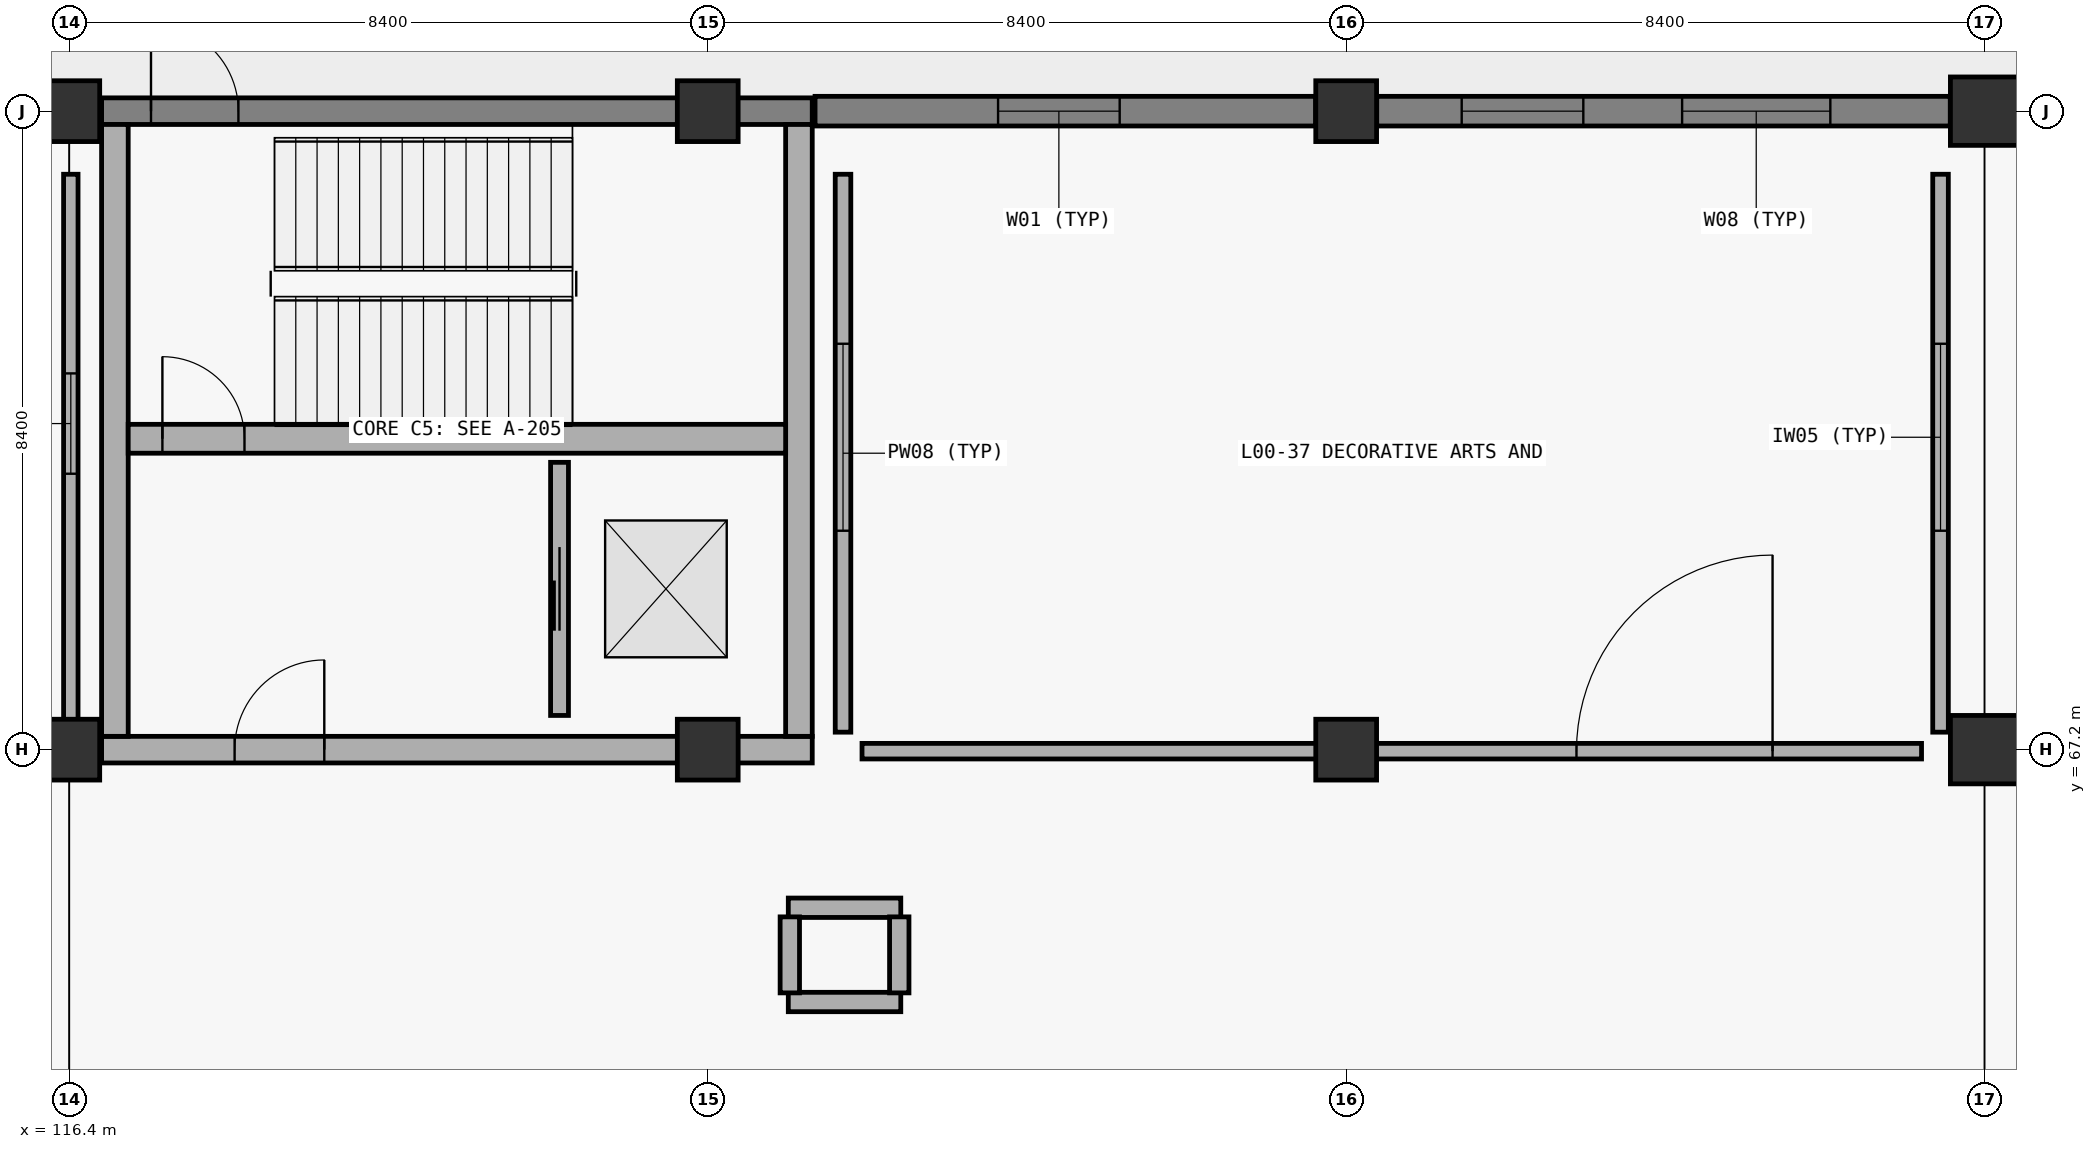
"""IFC4 building model, lengths in metres.
Left out: names, types, materials, properties, quantities, classifications, styles, units other than length and angle.
Written with IfcOpenShell. Run it as: python <this file> out.ifc"""

import sys

from ifc_helpers import new_model, si_unit, direction, frame, frame_2d, origin, origin_2d, place, context, subcontext, project, spatial, rectangle, extrude, element, fill, save


model = new_model("IFC4")
c1 = context("Model", 3, precision=1e-05, world=origin(), true_north=direction((0.0, 1.0)))
c2 = subcontext(c1, "Body", "Model", "MODEL_VIEW")
j1 = project(units=[si_unit("LENGTHUNIT", "METRE"), si_unit("PLANEANGLEUNIT", "RADIAN")], contexts=[c1])
p1 = place(None, origin())
s1 = spatial("IfcSite", under=j1, at=p1, CompositionType="ELEMENT")
p2 = place(p1, origin())
s2 = spatial("IfcBuilding", under=s1, at=p2, CompositionType="ELEMENT")
p3 = place(p2, origin())
s3 = spatial("IfcBuildingStorey", under=s2, at=p3, CompositionType="ELEMENT", Elevation=0.0)
for number, where, z_axis, x_axis in (
    (1, (116.4, 67.2, 0.0), (0.0, 0.0, 1.0), (1.0, 0.0, 0.0)),
    (2, (116.4, 75.6, 0.0), (0.0, 0.0, 1.0), (1.0, 0.0, 0.0)),
    (3, (124.8, 67.2, 0.0), (0.0, 0.0, 1.0), (1.0, 0.0, 0.0)),
    (4, (124.8, 75.6, 0.0), (0.0, 0.0, 1.0), (1.0, 0.0, 0.0)),
    (5, (133.2, 67.2, 0.0), (0.0, 0.0, 1.0), (1.0, 0.0, 0.0)),
    (6, (133.2, 75.6, 0.0), (0.0, 0.0, 1.0), (1.0, 0.0, 0.0)),
):
    element("IfcColumn", number, at=place(p3, frame(where, z_axis=z_axis, x_axis=x_axis)), inside=s3, PredefinedType="COLUMN", context=c2, shape_type="SweptSolid", body=[
        extrude(rectangle(XDim=0.8, YDim=0.8, at=origin_2d()), origin(), (0.0, 0.0, 1.0), 5.4),
    ])
for number, where, z_axis, x_axis in (
    (7, (141.6, 67.2, 0.0), (0.0, 0.0, 1.0), (1.0, 0.0, 0.0)),
    (8, (141.6, 75.6, 0.0), (0.0, 0.0, 1.0), (1.0, 0.0, 0.0)),
):
    element("IfcColumn", number, at=place(p3, frame(where, z_axis=z_axis, x_axis=x_axis)), inside=s3, PredefinedType="COLUMN", context=c2, shape_type="SweptSolid", body=[
        extrude(rectangle(XDim=0.9, YDim=0.9, at=origin_2d()), origin(), (0.0, 0.0, 1.0), 5.4),
    ])
p4 = place(p3, frame((116.825, 67.2, 0.0), z_axis=(0.0, 0.0, 1.0), x_axis=(1.0, 0.0, 0.0)))
e9 = element("IfcWall", 9, at=p4, inside=s3, PredefinedType="SHEAR", context=c2, shape_type="SweptSolid", body=[
    extrude(rectangle(XDim=9.35, YDim=0.35, at=frame_2d((4.675, 0.0))), origin(), (0.0, 0.0, 1.0), 5.4),
])
p5 = place(p4, frame((1.75, 0.0, 0.0)))
e10 = element("IfcOpeningElement", 10, at=p5, cuts=e9, PredefinedType="OPENING", context=c2, shape_type="SweptSolid", body=[
    extrude(rectangle(XDim=1.18, YDim=2.24, at=frame_2d((0.59, 1.12))), frame((0.0, 0.185, 0.0), z_axis=(0.0, -1.0, 0.0), x_axis=(1.0, 0.0, 0.0)), (0.0, 0.0, 1.0), 0.37),
])
p6 = place(p3, frame((116.825, 75.6, 0.0), z_axis=(0.0, 0.0, 1.0), x_axis=(1.0, 0.0, 0.0)))
e11 = element("IfcWall", 11, at=p6, inside=s3, PredefinedType="SHEAR", context=c2, shape_type="SweptSolid", body=[
    extrude(rectangle(XDim=9.35, YDim=0.35, at=frame_2d((4.675, 0.0))), origin(), (0.0, 0.0, 1.0), 5.4),
])
p7 = place(p6, frame((0.65, 0.0, 0.0)))
e12 = element("IfcOpeningElement", 12, at=p7, cuts=e11, PredefinedType="OPENING", context=c2, shape_type="SweptSolid", body=[
    extrude(rectangle(XDim=1.15, YDim=2.2, at=frame_2d((0.575, 1.1))), frame((0.0, 0.185, 0.0), z_axis=(0.0, -1.0, 0.0), x_axis=(1.0, 0.0, 0.0)), (0.0, 0.0, 1.0), 0.37),
])
for number, where, z_axis, x_axis in (
    (13, (117.0, 67.375, 0.0), (0.0, 0.0, 1.0), (0.0, 1.0, 0.0)),
    (14, (126.0, 67.375, 0.0), (0.0, 0.0, 1.0), (0.0, 1.0, 0.0)),
):
    element("IfcWall", number, at=place(p3, frame(where, z_axis=z_axis, x_axis=x_axis)), inside=s3, PredefinedType="SHEAR", context=c2, shape_type="SweptSolid", body=[
        extrude(rectangle(XDim=8.05, YDim=0.35, at=frame_2d((4.025, 0.0))), origin(), (0.0, 0.0, 1.0), 5.4),
    ])
p8 = place(p3, frame((117.175, 71.29, 0.0), z_axis=(0.0, 0.0, 1.0), x_axis=(1.0, 0.0, 0.0)))
e15 = element("IfcWall", 15, at=p8, inside=s3, PredefinedType="SHEAR", context=c2, shape_type="SweptSolid", body=[
    extrude(rectangle(XDim=8.65, YDim=0.38, at=frame_2d((4.325, 0.0))), origin(), (0.0, 0.0, 1.0), 5.4),
])
p9 = place(p8, frame((0.45, 0.0, 0.0)))
e16 = element("IfcOpeningElement", 16, at=p9, cuts=e15, PredefinedType="OPENING", context=c2, shape_type="SweptSolid", body=[
    extrude(rectangle(XDim=1.08, YDim=2.18, at=frame_2d((0.54, 1.09))), frame((0.0, 0.2, 0.0), z_axis=(0.0, -1.0, 0.0), x_axis=(1.0, 0.0, 0.0)), (0.0, 0.0, 1.0), 0.4),
])
p10 = place(p3, frame((108.402, 75.6, 0.0), z_axis=(0.0, 0.0, 1.0), x_axis=(1.0, 0.0, 0.0)))
e17 = element("IfcWall", 17, at=p10, inside=s3, PredefinedType="SOLIDWALL", context=c2, shape_type="SweptSolid", body=[
    extrude(rectangle(XDim=8.386, YDim=0.39, at=frame_2d((4.193, 0.0))), origin(), (0.0, 0.0, 1.0), 4.09),
])
p11 = place(p10, frame((1.118, 0.0, 0.85)))
e18 = element("IfcOpeningElement", 18, at=p11, cuts=e17, PredefinedType="OPENING", context=c2, shape_type="SweptSolid", body=[
    extrude(rectangle(XDim=1.6, YDim=2.5, at=frame_2d((0.8, 1.25))), frame((0.0, 0.205, 0.0), z_axis=(0.0, -1.0, 0.0), x_axis=(1.0, 0.0, 0.0)), (0.0, 0.0, 1.0), 0.41),
])
p12 = place(p10, frame((4.018, 0.0, 0.85)))
e19 = element("IfcOpeningElement", 19, at=p12, cuts=e17, PredefinedType="OPENING", context=c2, shape_type="SweptSolid", body=[
    extrude(rectangle(XDim=1.95, YDim=2.3, at=frame_2d((0.975, 1.15))), frame((0.0, 0.205, 0.0), z_axis=(0.0, -1.0, 0.0), x_axis=(1.0, 0.0, 0.0)), (0.0, 0.0, 1.0), 0.41),
])
p13 = place(p3, frame((126.212, 75.6, 0.0), z_axis=(0.0, 0.0, 1.0), x_axis=(1.0, 0.0, 0.0)))
e20 = element("IfcWall", 20, at=p13, inside=s3, PredefinedType="SOLIDWALL", context=c2, shape_type="SweptSolid", body=[
    extrude(rectangle(XDim=6.586, YDim=0.39, at=frame_2d((3.293, 0.0))), origin(), (0.0, 0.0, 1.0), 4.09),
])
p14 = place(p13, frame((2.408, 0.0, 0.85)))
e21 = element("IfcOpeningElement", 21, at=p14, cuts=e20, PredefinedType="OPENING", context=c2, shape_type="SweptSolid", body=[
    extrude(rectangle(XDim=1.6, YDim=2.5, at=frame_2d((0.8, 1.25))), frame((0.0, 0.205, 0.0), z_axis=(0.0, -1.0, 0.0), x_axis=(1.0, 0.0, 0.0)), (0.0, 0.0, 1.0), 0.41),
])
p15 = place(p3, frame((133.602, 75.6, 0.0), z_axis=(0.0, 0.0, 1.0), x_axis=(1.0, 0.0, 0.0)))
e22 = element("IfcWall", 22, at=p15, inside=s3, PredefinedType="SOLIDWALL", context=c2, shape_type="SweptSolid", body=[
    extrude(rectangle(XDim=7.546, YDim=0.39, at=frame_2d((3.773, 0.0))), origin(), (0.0, 0.0, 1.0), 4.09),
])
p16 = place(p15, frame((1.118, 0.0, 0.85)))
e23 = element("IfcOpeningElement", 23, at=p16, cuts=e22, PredefinedType="OPENING", context=c2, shape_type="SweptSolid", body=[
    extrude(rectangle(XDim=1.6, YDim=2.5, at=frame_2d((0.8, 1.25))), frame((0.0, 0.205, 0.0), z_axis=(0.0, -1.0, 0.0), x_axis=(1.0, 0.0, 0.0)), (0.0, 0.0, 1.0), 0.41),
])
p17 = place(p15, frame((4.018, 0.0, 0.85)))
e24 = element("IfcOpeningElement", 24, at=p17, cuts=e22, PredefinedType="OPENING", context=c2, shape_type="SweptSolid", body=[
    extrude(rectangle(XDim=1.95, YDim=2.3, at=frame_2d((0.975, 1.15))), frame((0.0, 0.205, 0.0), z_axis=(0.0, -1.0, 0.0), x_axis=(1.0, 0.0, 0.0)), (0.0, 0.0, 1.0), 0.41),
])
p18 = place(p3, frame((122.85, 67.65, 0.0), z_axis=(0.0, 0.0, 1.0), x_axis=(0.0, 1.0, 0.0)))
e25 = element("IfcWall", 25, at=p18, inside=s3, PredefinedType="PARTITIONING", context=c2, shape_type="SweptSolid", body=[
    extrude(rectangle(XDim=3.33, YDim=0.235, at=frame_2d((1.665, 0.0))), origin(), (0.0, 0.0, 1.0), 5.04),
])
p19 = place(p18, frame((1.115, 0.0, 0.0)))
e26 = element("IfcOpeningElement", 26, at=p19, cuts=e25, PredefinedType="OPENING", context=c2, shape_type="SweptSolid", body=[
    extrude(rectangle(XDim=1.1, YDim=2.2, at=frame_2d((0.55, 1.1))), frame((0.0, 0.127, 0.0), z_axis=(0.0, -1.0, 0.0), x_axis=(1.0, 0.0, 0.0)), (0.0, 0.0, 1.0), 0.255),
])
for number, where, z_axis, x_axis in (
    (27, (125.86, 65.12, 0.0), (0.0, 0.0, 1.0), (1.0, 0.0, 0.0)),
    (28, (125.86, 63.88, 0.0), (0.0, 0.0, 1.0), (1.0, 0.0, 0.0)),
):
    element("IfcWall", number, at=place(p3, frame(where, z_axis=z_axis, x_axis=x_axis)), inside=s3, PredefinedType="PARTITIONING", context=c2, shape_type="SweptSolid", body=[
        extrude(rectangle(XDim=1.48, YDim=0.255, at=frame_2d((0.74, 0.0))), origin(), (0.0, 0.0, 1.0), 4.77),
    ])
p20 = place(p3, frame((125.88, 64.0, 0.0), z_axis=(0.0, 0.0, 1.0), x_axis=(0.0, 1.0, 0.0)))
e29 = element("IfcWall", 29, at=p20, inside=s3, PredefinedType="PARTITIONING", context=c2, shape_type="SweptSolid", body=[
    extrude(rectangle(XDim=1.0, YDim=0.255, at=frame_2d((0.5, 0.0))), origin(), (0.0, 0.0, 1.0), 5.04),
])
p21 = place(p3, frame((127.32, 64.0, 0.0), z_axis=(0.0, 0.0, 1.0), x_axis=(0.0, 1.0, 0.0)))
e30 = element("IfcWall", 30, at=p21, inside=s3, PredefinedType="PARTITIONING", context=c2, shape_type="SweptSolid", body=[
    extrude(rectangle(XDim=1.0, YDim=0.255, at=frame_2d((0.5, 0.0))), origin(), (0.0, 0.0, 1.0), 4.77),
])
p22 = place(p3, frame((116.42, 67.43, 0.0), z_axis=(0.0, 0.0, 1.0), x_axis=(0.0, 1.0, 0.0)))
e31 = element("IfcWall", 31, at=p22, inside=s3, PredefinedType="PARTITIONING", context=c2, shape_type="SweptSolid", body=[
    extrude(rectangle(XDim=7.34, YDim=0.19, at=frame_2d((3.67, 0.0))), origin(), (0.0, 0.0, 1.0), 4.09),
])
p23 = place(p22, frame((3.4, 0.0, 0.9)))
e32 = element("IfcOpeningElement", 32, at=p23, cuts=e31, PredefinedType="OPENING", context=c2, shape_type="SweptSolid", body=[
    extrude(rectangle(XDim=1.32, YDim=1.5, at=frame_2d((0.66, 0.75))), frame((0.0, 0.105, 0.0), z_axis=(0.0, -1.0, 0.0), x_axis=(1.0, 0.0, 0.0)), (0.0, 0.0, 1.0), 0.21),
])
p24 = place(p3, frame((126.83, 67.18, 0.0), z_axis=(0.0, 0.0, 1.0), x_axis=(1.0, 0.0, 0.0)))
e33 = element("IfcWall", 33, at=p24, inside=s3, PredefinedType="PARTITIONING", context=c2, shape_type="SweptSolid", body=[
    extrude(rectangle(XDim=13.94, YDim=0.205, at=frame_2d((6.97, 0.0))), origin(), (0.0, 0.0, 1.0), 4.09),
])
p25 = place(p24, frame((9.4, 0.0, 0.0)))
e34 = element("IfcOpeningElement", 34, at=p25, cuts=e33, PredefinedType="OPENING", context=c2, shape_type="SweptSolid", body=[
    extrude(rectangle(XDim=2.58, YDim=2.82, at=frame_2d((1.29, 1.41))), frame((0.0, 0.113, 0.0), z_axis=(0.0, -1.0, 0.0), x_axis=(1.0, 0.0, 0.0)), (0.0, 0.0, 1.0), 0.225),
])
p26 = place(p3, frame((126.58, 67.43, 0.0), z_axis=(0.0, 0.0, 1.0), x_axis=(0.0, 1.0, 0.0)))
e35 = element("IfcWall", 35, at=p26, inside=s3, PredefinedType="PARTITIONING", context=c2, shape_type="SweptSolid", body=[
    extrude(rectangle(XDim=7.34, YDim=0.205, at=frame_2d((3.67, 0.0))), origin(), (0.0, 0.0, 1.0), 4.59),
])
p27 = place(p26, frame((2.65, 0.0, 0.9)))
e36 = element("IfcOpeningElement", 36, at=p27, cuts=e35, PredefinedType="OPENING", context=c2, shape_type="SweptSolid", body=[
    extrude(rectangle(XDim=2.46, YDim=1.38, at=frame_2d((1.23, 0.69))), frame((0.0, 0.113, 0.0), z_axis=(0.0, -1.0, 0.0), x_axis=(1.0, 0.0, 0.0)), (0.0, 0.0, 1.0), 0.225),
])
p28 = place(p3, frame((141.02, 67.43, 0.0), z_axis=(0.0, 0.0, 1.0), x_axis=(0.0, 1.0, 0.0)))
e37 = element("IfcWall", 37, at=p28, inside=s3, PredefinedType="PARTITIONING", context=c2, shape_type="SweptSolid", body=[
    extrude(rectangle(XDim=7.34, YDim=0.205, at=frame_2d((3.67, 0.0))), origin(), (0.0, 0.0, 1.0), 4.29),
])
p29 = place(p28, frame((2.65, 0.0, 0.9)))
e38 = element("IfcOpeningElement", 38, at=p29, cuts=e37, PredefinedType="OPENING", context=c2, shape_type="SweptSolid", body=[
    extrude(rectangle(XDim=2.46, YDim=1.38, at=frame_2d((1.23, 0.69))), frame((0.0, 0.113, 0.0), z_axis=(0.0, -1.0, 0.0), x_axis=(1.0, 0.0, 0.0)), (0.0, 0.0, 1.0), 0.225),
])
p30 = place(p14, origin())
e39 = element("IfcWindow", 39, at=p30, inside=s3, PartitioningType="SINGLE_PANEL", PredefinedType="WINDOW", context=c2, shape_type="SweptSolid", body=[
    extrude(rectangle(XDim=1.6, YDim=2.5, at=frame_2d((0.8, 1.25))), frame((0.0, 0.03, 0.0), z_axis=(0.0, -1.0, 0.0), x_axis=(1.0, 0.0, 0.0)), (0.0, 0.0, 1.0), 0.06),
])
fill(e21, e39)
p31 = place(p16, origin())
e40 = element("IfcWindow", 40, at=p31, inside=s3, PartitioningType="SINGLE_PANEL", PredefinedType="WINDOW", context=c2, shape_type="SweptSolid", body=[
    extrude(rectangle(XDim=1.6, YDim=2.5, at=frame_2d((0.8, 1.25))), frame((0.0, 0.03, 0.0), z_axis=(0.0, -1.0, 0.0), x_axis=(1.0, 0.0, 0.0)), (0.0, 0.0, 1.0), 0.06),
])
fill(e23, e40)
p32 = place(p17, origin())
e41 = element("IfcWindow", 41, at=p32, inside=s3, PartitioningType="SINGLE_PANEL", PredefinedType="WINDOW", context=c2, shape_type="SweptSolid", body=[
    extrude(rectangle(XDim=1.95, YDim=2.3, at=frame_2d((0.975, 1.15))), frame((0.0, 0.03, 0.0), z_axis=(0.0, -1.0, 0.0), x_axis=(1.0, 0.0, 0.0)), (0.0, 0.0, 1.0), 0.06),
])
fill(e24, e41)
p33 = place(p7, origin())
e42 = element("IfcDoor", 42, at=p33, inside=s3, OperationType="SINGLE_SWING_LEFT", PredefinedType="DOOR", context=c2, shape_type="SweptSolid", body=[
    extrude(rectangle(XDim=1.15, YDim=2.2, at=frame_2d((0.575, 1.1))), frame((0.0, 0.025, 0.0), z_axis=(0.0, -1.0, 0.0), x_axis=(1.0, 0.0, 0.0)), (0.0, 0.0, 1.0), 0.05),
])
fill(e12, e42)
p34 = place(p9, origin())
e43 = element("IfcDoor", 43, at=p34, inside=s3, OperationType="SINGLE_SWING_LEFT", PredefinedType="DOOR", context=c2, shape_type="SweptSolid", body=[
    extrude(rectangle(XDim=1.08, YDim=2.18, at=frame_2d((0.54, 1.09))), frame((0.0, 0.025, 0.0), z_axis=(0.0, -1.0, 0.0), x_axis=(1.0, 0.0, 0.0)), (0.0, 0.0, 1.0), 0.05),
])
fill(e16, e43)
p35 = place(p5, origin())
e44 = element("IfcDoor", 44, at=p35, inside=s3, OperationType="SINGLE_SWING_RIGHT", PredefinedType="DOOR", context=c2, shape_type="SweptSolid", body=[
    extrude(rectangle(XDim=1.18, YDim=2.24, at=frame_2d((0.59, 1.12))), frame((0.0, 0.025, 0.0), z_axis=(0.0, -1.0, 0.0), x_axis=(1.0, 0.0, 0.0)), (0.0, 0.0, 1.0), 0.05),
])
fill(e10, e44)
p36 = place(p19, origin())
e45 = element("IfcDoor", 45, at=p36, inside=s3, OperationType="SLIDING_TO_LEFT", PredefinedType="DOOR", context=c2, shape_type="SweptSolid", body=[
    extrude(rectangle(XDim=1.1, YDim=2.2, at=frame_2d((0.55, 1.1))), frame((0.0, 0.025, 0.0), z_axis=(0.0, -1.0, 0.0), x_axis=(1.0, 0.0, 0.0)), (0.0, 0.0, 1.0), 0.05),
])
fill(e26, e45)
p37 = place(p23, origin())
e46 = element("IfcWindow", 46, at=p37, inside=s3, PartitioningType="SINGLE_PANEL", PredefinedType="WINDOW", context=c2, shape_type="SweptSolid", body=[
    extrude(rectangle(XDim=1.32, YDim=1.5, at=frame_2d((0.66, 0.75))), frame((0.0, 0.03, 0.0), z_axis=(0.0, -1.0, 0.0), x_axis=(1.0, 0.0, 0.0)), (0.0, 0.0, 1.0), 0.06),
])
fill(e32, e46)
p38 = place(p25, origin())
e47 = element("IfcDoor", 47, at=p38, inside=s3, OperationType="DOUBLE_SWING_RIGHT", PredefinedType="GATE", context=c2, shape_type="SweptSolid", body=[
    extrude(rectangle(XDim=2.58, YDim=2.82, at=frame_2d((1.29, 1.41))), frame((0.0, 0.025, 0.0), z_axis=(0.0, -1.0, 0.0), x_axis=(1.0, 0.0, 0.0)), (0.0, 0.0, 1.0), 0.05),
])
fill(e34, e47)
p39 = place(p27, origin())
e48 = element("IfcWindow", 48, at=p39, inside=s3, PartitioningType="SINGLE_PANEL", PredefinedType="WINDOW", context=c2, shape_type="SweptSolid", body=[
    extrude(rectangle(XDim=2.46, YDim=1.38, at=frame_2d((1.23, 0.69))), frame((0.0, 0.03, 0.0), z_axis=(0.0, -1.0, 0.0), x_axis=(1.0, 0.0, 0.0)), (0.0, 0.0, 1.0), 0.06),
])
fill(e36, e48)
p40 = place(p29, origin())
e49 = element("IfcWindow", 49, at=p40, inside=s3, PartitioningType="SINGLE_PANEL", PredefinedType="WINDOW", context=c2, shape_type="SweptSolid", body=[
    extrude(rectangle(XDim=2.46, YDim=1.38, at=frame_2d((1.23, 0.69))), frame((0.0, 0.03, 0.0), z_axis=(0.0, -1.0, 0.0), x_axis=(1.0, 0.0, 0.0)), (0.0, 0.0, 1.0), 0.06),
])
fill(e38, e49)
save(model, sys.argv[1])
